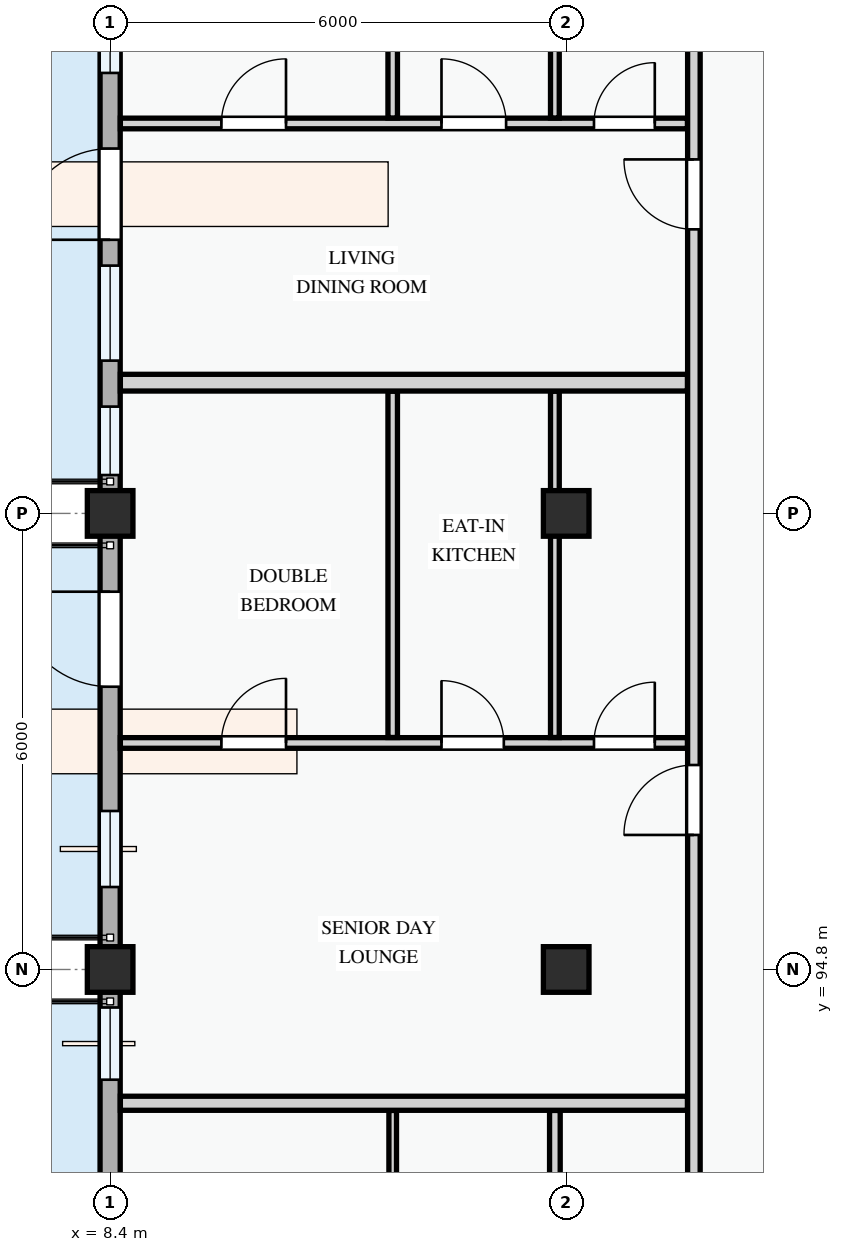
"""IFC4 building model, lengths in metres.
Left out: names, types, materials, properties, quantities, classifications, styles, units other than length and angle.
Written with IfcOpenShell. Run it as: python <this file> out.ifc"""

import sys

from ifc_helpers import new_model, si_unit, direction, frame, frame_2d, origin, origin_2d, place, context, subcontext, project, spatial, rectangle, extrude, element, fill, save


model = new_model("IFC4")
c1 = context("Model", 3, precision=1e-05, world=origin(), true_north=direction((0.0, 1.0)))
c2 = subcontext(c1, "Body", "Model", "MODEL_VIEW")
j1 = project(units=[si_unit("LENGTHUNIT", "METRE"), si_unit("PLANEANGLEUNIT", "RADIAN")], contexts=[c1])
p1 = place(None, origin())
s1 = spatial("IfcSite", under=j1, at=p1, CompositionType="ELEMENT")
p2 = place(p1, origin())
s2 = spatial("IfcBuilding", under=s1, at=p2, CompositionType="ELEMENT")
p3 = place(p2, frame((0.0, 0.0, 34.5)))
s3 = spatial("IfcBuildingStorey", under=s2, at=p3, CompositionType="ELEMENT", Elevation=34.5)
for number, where, z_axis, x_axis in (
    (1, (8.4, 94.8, 0.0), (0.0, 0.0, 1.0), (1.0, 0.0, 0.0)),
    (2, (8.4, 100.8, 0.0), (0.0, 0.0, 1.0), (1.0, 0.0, 0.0)),
    (3, (14.4, 94.8, 0.0), (0.0, 0.0, 1.0), (1.0, 0.0, 0.0)),
    (4, (14.4, 100.8, 0.0), (0.0, 0.0, 1.0), (1.0, 0.0, 0.0)),
):
    element("IfcColumn", number, at=place(p3, frame(where, z_axis=z_axis, x_axis=x_axis)), inside=s3, PredefinedType="COLUMN", context=c2, shape_type="SweptSolid", body=[
        extrude(rectangle(XDim=0.6, YDim=0.6, at=origin_2d()), origin(), (0.0, 0.0, 1.0), 3.3),
    ])
p4 = place(p3, frame((8.4, 109.2, 0.0), z_axis=(0.0, 0.0, 1.0), x_axis=(0.0, -1.0, 0.0)))
e5 = element("IfcWall", 5, at=p4, inside=s3, PredefinedType="STANDARD", context=c2, shape_type="SweptSolid", body=[
    extrude(rectangle(XDim=8.4, YDim=0.265, at=frame_2d((4.2, 0.0))), origin(), (0.0, 0.0, 1.0), 2.345),
])
p5 = place(p4, frame((3.6, 0.0, 0.0)))
e6 = element("IfcOpeningElement", 6, at=p5, cuts=e5, PredefinedType="OPENING", context=c2, shape_type="SweptSolid", body=[
    extrude(rectangle(XDim=1.2, YDim=2.15, at=frame_2d((0.6, 1.075))), frame((0.0, 0.143, 0.0), z_axis=(0.0, -1.0, 0.0), x_axis=(1.0, 0.0, 0.0)), (0.0, 0.0, 1.0), 0.285),
])
p6 = place(p4, frame((0.855, 0.0, 0.78)))
e7 = element("IfcOpeningElement", 7, at=p6, cuts=e5, PredefinedType="OPENING", context=c2, shape_type="SweptSolid", body=[
    extrude(rectangle(XDim=1.75, YDim=1.45, at=frame_2d((0.875, 0.725))), frame((0.0, 0.143, 0.0), z_axis=(0.0, -1.0, 0.0), x_axis=(1.0, 0.0, 0.0)), (0.0, 0.0, 1.0), 0.285),
])
p7 = place(p4, frame((5.14, 0.0, 0.78)))
e8 = element("IfcOpeningElement", 8, at=p7, cuts=e5, PredefinedType="OPENING", context=c2, shape_type="SweptSolid", body=[
    extrude(rectangle(XDim=1.25, YDim=1.45, at=frame_2d((0.625, 0.725))), frame((0.0, 0.143, 0.0), z_axis=(0.0, -1.0, 0.0), x_axis=(1.0, 0.0, 0.0)), (0.0, 0.0, 1.0), 0.285),
])
p8 = place(p4, frame((6.995, 0.0, 0.78)))
e9 = element("IfcOpeningElement", 9, at=p8, cuts=e5, PredefinedType="OPENING", context=c2, shape_type="SweptSolid", body=[
    extrude(rectangle(XDim=0.9, YDim=1.2, at=frame_2d((0.45, 0.6))), frame((0.0, 0.143, 0.0), z_axis=(0.0, -1.0, 0.0), x_axis=(1.0, 0.0, 0.0)), (0.0, 0.0, 1.0), 0.285),
])
p9 = place(p3, frame((8.4, 100.8, 0.0), z_axis=(0.0, 0.0, 1.0), x_axis=(0.0, -1.0, 0.0)))
e10 = element("IfcWall", 10, at=p9, inside=s3, PredefinedType="STANDARD", context=c2, shape_type="SweptSolid", body=[
    extrude(rectangle(XDim=6.0, YDim=0.265, at=frame_2d((3.0, 0.0))), origin(), (0.0, 0.0, 1.0), 2.445),
])
p10 = place(p9, frame((1.03, 0.0, 0.0)))
e11 = element("IfcOpeningElement", 11, at=p10, cuts=e10, PredefinedType="OPENING", context=c2, shape_type="SweptSolid", body=[
    extrude(rectangle(XDim=1.25, YDim=2.2, at=frame_2d((0.625, 1.1))), frame((0.0, 0.143, 0.0), z_axis=(0.0, -1.0, 0.0), x_axis=(1.0, 0.0, 0.0)), (0.0, 0.0, 1.0), 0.285),
])
p11 = place(p9, frame((3.915, 0.0, 0.78)))
e12 = element("IfcOpeningElement", 12, at=p11, cuts=e10, PredefinedType="OPENING", context=c2, shape_type="SweptSolid", body=[
    extrude(rectangle(XDim=1.0, YDim=1.25, at=frame_2d((0.5, 0.625))), frame((0.0, 0.143, 0.0), z_axis=(0.0, -1.0, 0.0), x_axis=(1.0, 0.0, 0.0)), (0.0, 0.0, 1.0), 0.285),
])
p12 = place(p3, frame((8.4, 94.8, 0.0), z_axis=(0.0, 0.0, 1.0), x_axis=(0.0, -1.0, 0.0)))
e13 = element("IfcWall", 13, at=p12, inside=s3, PredefinedType="STANDARD", context=c2, shape_type="SweptSolid", body=[
    extrude(rectangle(XDim=8.4, YDim=0.265, at=frame_2d((4.2, 0.0))), origin(), (0.0, 0.0, 1.0), 2.345),
])
p13 = place(p12, frame((2.755, 0.0, 0.0)))
e14 = element("IfcOpeningElement", 14, at=p13, cuts=e13, PredefinedType="OPENING", context=c2, shape_type="SweptSolid", body=[
    extrude(rectangle(XDim=1.3, YDim=2.15, at=frame_2d((0.65, 1.075))), frame((0.0, 0.143, 0.0), z_axis=(0.0, -1.0, 0.0), x_axis=(1.0, 0.0, 0.0)), (0.0, 0.0, 1.0), 0.285),
])
p14 = place(p12, frame((0.5, 0.0, 0.78)))
e15 = element("IfcOpeningElement", 15, at=p14, cuts=e13, PredefinedType="OPENING", context=c2, shape_type="SweptSolid", body=[
    extrude(rectangle(XDim=0.95, YDim=1.15, at=frame_2d((0.475, 0.575))), frame((0.0, 0.143, 0.0), z_axis=(0.0, -1.0, 0.0), x_axis=(1.0, 0.0, 0.0)), (0.0, 0.0, 1.0), 0.285),
])
p15 = place(p12, frame((5.72, 0.0, 0.78)))
e16 = element("IfcOpeningElement", 16, at=p15, cuts=e13, PredefinedType="OPENING", context=c2, shape_type="SweptSolid", body=[
    extrude(rectangle(XDim=1.82, YDim=1.46, at=frame_2d((0.91, 0.73))), frame((0.0, 0.143, 0.0), z_axis=(0.0, -1.0, 0.0), x_axis=(1.0, 0.0, 0.0)), (0.0, 0.0, 1.0), 0.285),
])
p16 = place(p3, frame((12.118, 89.81, 0.0), z_axis=(0.0, 0.0, 1.0), x_axis=(0.0, 1.0, 0.0)))
e17 = element("IfcWall", 17, at=p16, inside=s3, PredefinedType="PARTITIONING", context=c2, shape_type="SweptSolid", body=[
    extrude(rectangle(XDim=3.136, YDim=0.1, at=frame_2d((1.568, 0.0))), origin(), (0.0, 0.0, 1.0), 3.0),
])
p17 = place(p3, frame((14.251, 89.81, 0.0), z_axis=(0.0, 0.0, 1.0), x_axis=(0.0, 1.0, 0.0)))
e18 = element("IfcWall", 18, at=p17, inside=s3, PredefinedType="PARTITIONING", context=c2, shape_type="SweptSolid", body=[
    extrude(rectangle(XDim=3.136, YDim=0.14, at=frame_2d((1.568, 0.0))), origin(), (0.0, 0.0, 1.0), 2.425),
])
p18 = place(p3, frame((8.534, 97.78, 0.0), z_axis=(0.0, 0.0, 1.0), x_axis=(1.0, 0.0, 0.0)))
e19 = element("IfcWall", 19, at=p18, inside=s3, PredefinedType="PARTITIONING", context=c2, shape_type="SweptSolid", body=[
    extrude(rectangle(XDim=7.461, YDim=0.14, at=frame_2d((3.73, 0.0))), origin(), (0.0, 0.0, 1.0), 3.0),
])
p19 = place(p18, frame((1.329, 0.0, 0.0)))
e20 = element("IfcOpeningElement", 20, at=p19, cuts=e19, PredefinedType="OPENING", context=c2, shape_type="SweptSolid", body=[
    extrude(rectangle(XDim=0.85, YDim=2.1, at=frame_2d((0.425, 1.05))), frame((0.0, 0.08, 0.0), z_axis=(0.0, -1.0, 0.0), x_axis=(1.0, 0.0, 0.0)), (0.0, 0.0, 1.0), 0.16),
])
p20 = place(p18, frame((4.225, 0.0, 0.0)))
e21 = element("IfcOpeningElement", 21, at=p20, cuts=e19, PredefinedType="OPENING", context=c2, shape_type="SweptSolid", body=[
    extrude(rectangle(XDim=0.82, YDim=2.08, at=frame_2d((0.41, 1.04))), frame((0.0, 0.08, 0.0), z_axis=(0.0, -1.0, 0.0), x_axis=(1.0, 0.0, 0.0)), (0.0, 0.0, 1.0), 0.16),
])
p21 = place(p18, frame((6.231, 0.0, 0.0)))
e22 = element("IfcOpeningElement", 22, at=p21, cuts=e19, PredefinedType="OPENING", context=c2, shape_type="SweptSolid", body=[
    extrude(rectangle(XDim=0.8, YDim=2.1, at=frame_2d((0.4, 1.05))), frame((0.0, 0.08, 0.0), z_axis=(0.0, -1.0, 0.0), x_axis=(1.0, 0.0, 0.0)), (0.0, 0.0, 1.0), 0.16),
])
p22 = place(p3, frame((12.118, 97.852, 0.0), z_axis=(0.0, 0.0, 1.0), x_axis=(0.0, 1.0, 0.0)))
e23 = element("IfcWall", 23, at=p22, inside=s3, PredefinedType="PARTITIONING", context=c2, shape_type="SweptSolid", body=[
    extrude(rectangle(XDim=4.556, YDim=0.125, at=frame_2d((2.278, 0.0))), origin(), (0.0, 0.0, 1.0), 3.0),
])
p23 = place(p3, frame((14.251, 97.852, 0.0), z_axis=(0.0, 0.0, 1.0), x_axis=(0.0, 1.0, 0.0)))
e24 = element("IfcWall", 24, at=p23, inside=s3, PredefinedType="PARTITIONING", context=c2, shape_type="SweptSolid", body=[
    extrude(rectangle(XDim=4.556, YDim=0.115, at=frame_2d((2.278, 0.0))), origin(), (0.0, 0.0, 1.0), 2.425),
])
p24 = place(p3, frame((8.534, 93.04, 0.0), z_axis=(0.0, 0.0, 1.0), x_axis=(1.0, 0.0, 0.0)))
e25 = element("IfcWall", 25, at=p24, inside=s3, PredefinedType="PARTITIONING", context=c2, shape_type="SweptSolid", body=[
    extrude(rectangle(XDim=7.461, YDim=0.185, at=frame_2d((3.73, 0.0))), origin(), (0.0, 0.0, 1.0), 3.0),
])
p25 = place(p3, frame((8.534, 105.93, 0.0), z_axis=(0.0, 0.0, 1.0), x_axis=(1.0, 0.0, 0.0)))
e26 = element("IfcWall", 26, at=p25, inside=s3, PredefinedType="PARTITIONING", context=c2, shape_type="SweptSolid", body=[
    extrude(rectangle(XDim=7.461, YDim=0.14, at=frame_2d((3.73, 0.0))), origin(), (0.0, 0.0, 1.0), 3.0),
])
p26 = place(p25, frame((1.329, 0.0, 0.0)))
e27 = element("IfcOpeningElement", 27, at=p26, cuts=e26, PredefinedType="OPENING", context=c2, shape_type="SweptSolid", body=[
    extrude(rectangle(XDim=0.85, YDim=2.1, at=frame_2d((0.425, 1.05))), frame((0.0, 0.08, 0.0), z_axis=(0.0, -1.0, 0.0), x_axis=(1.0, 0.0, 0.0)), (0.0, 0.0, 1.0), 0.16),
])
p27 = place(p25, frame((4.225, 0.0, 0.0)))
e28 = element("IfcOpeningElement", 28, at=p27, cuts=e26, PredefinedType="OPENING", context=c2, shape_type="SweptSolid", body=[
    extrude(rectangle(XDim=0.85, YDim=2.1, at=frame_2d((0.425, 1.05))), frame((0.0, 0.08, 0.0), z_axis=(0.0, -1.0, 0.0), x_axis=(1.0, 0.0, 0.0)), (0.0, 0.0, 1.0), 0.16),
])
p28 = place(p25, frame((6.231, 0.0, 0.0)))
e29 = element("IfcOpeningElement", 29, at=p28, cuts=e26, PredefinedType="OPENING", context=c2, shape_type="SweptSolid", body=[
    extrude(rectangle(XDim=0.8, YDim=2.1, at=frame_2d((0.4, 1.05))), frame((0.0, 0.08, 0.0), z_axis=(0.0, -1.0, 0.0), x_axis=(1.0, 0.0, 0.0)), (0.0, 0.0, 1.0), 0.16),
])
p29 = place(p3, frame((12.118, 106.002, 0.0), z_axis=(0.0, 0.0, 1.0), x_axis=(0.0, 1.0, 0.0)))
e30 = element("IfcWall", 30, at=p29, inside=s3, PredefinedType="PARTITIONING", context=c2, shape_type="SweptSolid", body=[
    extrude(rectangle(XDim=3.236, YDim=0.125, at=frame_2d((1.618, 0.0))), origin(), (0.0, 0.0, 1.0), 3.0),
])
p30 = place(p3, frame((14.251, 106.002, 0.0), z_axis=(0.0, 0.0, 1.0), x_axis=(0.0, 1.0, 0.0)))
e31 = element("IfcWall", 31, at=p30, inside=s3, PredefinedType="PARTITIONING", context=c2, shape_type="SweptSolid", body=[
    extrude(rectangle(XDim=3.236, YDim=0.115, at=frame_2d((1.618, 0.0))), origin(), (0.0, 0.0, 1.0), 2.425),
])
p31 = place(p3, frame((8.534, 102.52, 0.0), z_axis=(0.0, 0.0, 1.0), x_axis=(1.0, 0.0, 0.0)))
e32 = element("IfcWall", 32, at=p31, inside=s3, PredefinedType="PARTITIONING", context=c2, shape_type="SweptSolid", body=[
    extrude(rectangle(XDim=7.461, YDim=0.22, at=frame_2d((3.73, 0.0))), origin(), (0.0, 0.0, 1.0), 3.0),
])
p32 = place(p3, frame((16.08, 86.534, 0.0), z_axis=(0.0, 0.0, 1.0), x_axis=(0.0, 1.0, 0.0)))
e33 = element("IfcWall", 33, at=p32, inside=s3, PredefinedType="PARTITIONING", context=c2, shape_type="SweptSolid", body=[
    extrude(rectangle(XDim=22.806, YDim=0.165, at=frame_2d((11.403, 0.0))), origin(), (0.0, 0.0, 1.0), 3.0),
])
p33 = place(p32, frame((2.006, 0.0, 0.0)))
e34 = element("IfcOpeningElement", 34, at=p33, cuts=e33, PredefinedType="OPENING", context=c2, shape_type="SweptSolid", body=[
    extrude(rectangle(XDim=0.96, YDim=2.12, at=frame_2d((0.48, 1.06))), frame((0.0, 0.093, 0.0), z_axis=(0.0, -1.0, 0.0), x_axis=(1.0, 0.0, 0.0)), (0.0, 0.0, 1.0), 0.185),
])
p34 = place(p32, frame((10.035, 0.0, 0.0)))
e35 = element("IfcOpeningElement", 35, at=p34, cuts=e33, PredefinedType="OPENING", context=c2, shape_type="SweptSolid", body=[
    extrude(rectangle(XDim=0.92, YDim=2.1, at=frame_2d((0.46, 1.05))), frame((0.0, 0.093, 0.0), z_axis=(0.0, -1.0, 0.0), x_axis=(1.0, 0.0, 0.0)), (0.0, 0.0, 1.0), 0.185),
])
p35 = place(p32, frame((18.003, 0.0, 0.0)))
e36 = element("IfcOpeningElement", 36, at=p35, cuts=e33, PredefinedType="OPENING", context=c2, shape_type="SweptSolid", body=[
    extrude(rectangle(XDim=0.92, YDim=2.1, at=frame_2d((0.46, 1.05))), frame((0.0, 0.093, 0.0), z_axis=(0.0, -1.0, 0.0), x_axis=(1.0, 0.0, 0.0)), (0.0, 0.0, 1.0), 0.185),
])
p36 = place(p5, frame((1.2, 0.0, 0.0), z_axis=(0.0, 0.0, 1.0), x_axis=(-1.0, 0.0, 0.0)))
e37 = element("IfcDoor", 37, at=p36, inside=s3, OperationType="SINGLE_SWING_LEFT", PredefinedType="DOOR", context=c2, shape_type="SweptSolid", body=[
    extrude(rectangle(XDim=1.2, YDim=2.15, at=frame_2d((0.6, 1.075))), frame((0.0, 0.025, 0.0), z_axis=(0.0, -1.0, 0.0), x_axis=(1.0, 0.0, 0.0)), (0.0, 0.0, 1.0), 0.05),
])
fill(e6, e37)
p37 = place(p6, origin())
e38 = element("IfcWindow", 38, at=p37, inside=s3, PartitioningType="DOUBLE_PANEL_VERTICAL", PredefinedType="WINDOW", context=c2, shape_type="SweptSolid", body=[
    extrude(rectangle(XDim=1.75, YDim=1.45, at=frame_2d((0.875, 0.725))), frame((0.0, 0.03, 0.0), z_axis=(0.0, -1.0, 0.0), x_axis=(1.0, 0.0, 0.0)), (0.0, 0.0, 1.0), 0.06),
])
fill(e7, e38)
p38 = place(p7, origin())
e39 = element("IfcWindow", 39, at=p38, inside=s3, PartitioningType="SINGLE_PANEL", PredefinedType="WINDOW", context=c2, shape_type="SweptSolid", body=[
    extrude(rectangle(XDim=1.25, YDim=1.45, at=frame_2d((0.625, 0.725))), frame((0.0, 0.03, 0.0), z_axis=(0.0, -1.0, 0.0), x_axis=(1.0, 0.0, 0.0)), (0.0, 0.0, 1.0), 0.06),
])
fill(e8, e39)
p39 = place(p8, origin())
e40 = element("IfcWindow", 40, at=p39, inside=s3, PartitioningType="SINGLE_PANEL", PredefinedType="WINDOW", context=c2, shape_type="SweptSolid", body=[
    extrude(rectangle(XDim=0.9, YDim=1.2, at=frame_2d((0.45, 0.6))), frame((0.0, 0.03, 0.0), z_axis=(0.0, -1.0, 0.0), x_axis=(1.0, 0.0, 0.0)), (0.0, 0.0, 1.0), 0.06),
])
fill(e9, e40)
p40 = place(p10, frame((1.25, 0.0, 0.0), z_axis=(0.0, 0.0, 1.0), x_axis=(-1.0, 0.0, 0.0)))
e41 = element("IfcDoor", 41, at=p40, inside=s3, OperationType="SINGLE_SWING_RIGHT", PredefinedType="DOOR", context=c2, shape_type="SweptSolid", body=[
    extrude(rectangle(XDim=1.25, YDim=2.2, at=frame_2d((0.625, 1.1))), frame((0.0, 0.025, 0.0), z_axis=(0.0, -1.0, 0.0), x_axis=(1.0, 0.0, 0.0)), (0.0, 0.0, 1.0), 0.05),
])
fill(e11, e41)
p41 = place(p11, origin())
e42 = element("IfcWindow", 42, at=p41, inside=s3, PartitioningType="SINGLE_PANEL", PredefinedType="WINDOW", context=c2, shape_type="SweptSolid", body=[
    extrude(rectangle(XDim=1.0, YDim=1.25, at=frame_2d((0.5, 0.625))), frame((0.0, 0.03, 0.0), z_axis=(0.0, -1.0, 0.0), x_axis=(1.0, 0.0, 0.0)), (0.0, 0.0, 1.0), 0.06),
])
fill(e12, e42)
p42 = place(p14, origin())
e43 = element("IfcWindow", 43, at=p42, inside=s3, PartitioningType="SINGLE_PANEL", PredefinedType="WINDOW", context=c2, shape_type="SweptSolid", body=[
    extrude(rectangle(XDim=0.95, YDim=1.15, at=frame_2d((0.475, 0.575))), frame((0.0, 0.03, 0.0), z_axis=(0.0, -1.0, 0.0), x_axis=(1.0, 0.0, 0.0)), (0.0, 0.0, 1.0), 0.06),
])
fill(e15, e43)
p43 = place(p19, origin())
e44 = element("IfcDoor", 44, at=p43, inside=s3, OperationType="SINGLE_SWING_RIGHT", PredefinedType="DOOR", context=c2, shape_type="SweptSolid", body=[
    extrude(rectangle(XDim=0.85, YDim=2.1, at=frame_2d((0.425, 1.05))), frame((0.0, 0.025, 0.0), z_axis=(0.0, -1.0, 0.0), x_axis=(1.0, 0.0, 0.0)), (0.0, 0.0, 1.0), 0.05),
])
fill(e20, e44)
p44 = place(p20, origin())
e45 = element("IfcDoor", 45, at=p44, inside=s3, OperationType="SINGLE_SWING_LEFT", PredefinedType="DOOR", context=c2, shape_type="SweptSolid", body=[
    extrude(rectangle(XDim=0.82, YDim=2.08, at=frame_2d((0.41, 1.04))), frame((0.0, 0.025, 0.0), z_axis=(0.0, -1.0, 0.0), x_axis=(1.0, 0.0, 0.0)), (0.0, 0.0, 1.0), 0.05),
])
fill(e21, e45)
p45 = place(p21, origin())
e46 = element("IfcDoor", 46, at=p45, inside=s3, OperationType="SINGLE_SWING_RIGHT", PredefinedType="DOOR", context=c2, shape_type="SweptSolid", body=[
    extrude(rectangle(XDim=0.8, YDim=2.1, at=frame_2d((0.4, 1.05))), frame((0.0, 0.025, 0.0), z_axis=(0.0, -1.0, 0.0), x_axis=(1.0, 0.0, 0.0)), (0.0, 0.0, 1.0), 0.05),
])
fill(e22, e46)
p46 = place(p26, origin())
e47 = element("IfcDoor", 47, at=p46, inside=s3, OperationType="SINGLE_SWING_RIGHT", PredefinedType="DOOR", context=c2, shape_type="SweptSolid", body=[
    extrude(rectangle(XDim=0.85, YDim=2.1, at=frame_2d((0.425, 1.05))), frame((0.0, 0.025, 0.0), z_axis=(0.0, -1.0, 0.0), x_axis=(1.0, 0.0, 0.0)), (0.0, 0.0, 1.0), 0.05),
])
fill(e27, e47)
p47 = place(p27, origin())
e48 = element("IfcDoor", 48, at=p47, inside=s3, OperationType="SINGLE_SWING_LEFT", PredefinedType="DOOR", context=c2, shape_type="SweptSolid", body=[
    extrude(rectangle(XDim=0.85, YDim=2.1, at=frame_2d((0.425, 1.05))), frame((0.0, 0.025, 0.0), z_axis=(0.0, -1.0, 0.0), x_axis=(1.0, 0.0, 0.0)), (0.0, 0.0, 1.0), 0.05),
])
fill(e28, e48)
p48 = place(p28, origin())
e49 = element("IfcDoor", 49, at=p48, inside=s3, OperationType="SINGLE_SWING_RIGHT", PredefinedType="DOOR", context=c2, shape_type="SweptSolid", body=[
    extrude(rectangle(XDim=0.8, YDim=2.1, at=frame_2d((0.4, 1.05))), frame((0.0, 0.025, 0.0), z_axis=(0.0, -1.0, 0.0), x_axis=(1.0, 0.0, 0.0)), (0.0, 0.0, 1.0), 0.05),
])
fill(e29, e49)
p49 = place(p34, origin())
e50 = element("IfcDoor", 50, at=p49, inside=s3, OperationType="SINGLE_SWING_LEFT", PredefinedType="DOOR", context=c2, shape_type="SweptSolid", body=[
    extrude(rectangle(XDim=0.92, YDim=2.1, at=frame_2d((0.46, 1.05))), frame((0.0, 0.025, 0.0), z_axis=(0.0, -1.0, 0.0), x_axis=(1.0, 0.0, 0.0)), (0.0, 0.0, 1.0), 0.05),
])
fill(e35, e50)
p50 = place(p35, origin())
e51 = element("IfcDoor", 51, at=p50, inside=s3, OperationType="SINGLE_SWING_RIGHT", PredefinedType="DOOR", context=c2, shape_type="SweptSolid", body=[
    extrude(rectangle(XDim=0.92, YDim=2.1, at=frame_2d((0.46, 1.05))), frame((0.0, 0.025, 0.0), z_axis=(0.0, -1.0, 0.0), x_axis=(1.0, 0.0, 0.0)), (0.0, 0.0, 1.0), 0.05),
])
fill(e36, e51)
save(model, sys.argv[1])
